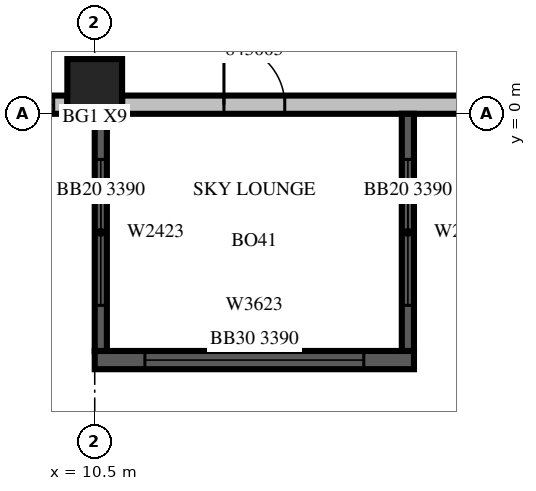
"""IFC4 building model, lengths in metres.
Left out: names, types, materials, properties, quantities, classifications, styles, units other than length and angle.
Written with IfcOpenShell. Run it as: python <this file> out.ifc"""

import sys

from ifc_helpers import new_model, si_unit, direction, frame, frame_2d, origin, origin_2d, place, context, subcontext, project, spatial, rectangle, extrude, source, transform, mapped, element, fill, save


model = new_model("IFC4")
c1 = context("Model", 3, precision=1e-05, world=origin(), true_north=direction((0.0, 1.0)))
c2 = subcontext(c1, "Body", "Model", "MODEL_VIEW")
j1 = project(units=[si_unit("LENGTHUNIT", "METRE"), si_unit("PLANEANGLEUNIT", "RADIAN")], contexts=[c1])
p1 = place(None, origin())
s1 = spatial("IfcSite", under=j1, at=p1, CompositionType="ELEMENT")
p2 = place(p1, origin())
s2 = spatial("IfcBuilding", under=s1, at=p2, CompositionType="ELEMENT")
p3 = place(p2, frame((0.0, 0.0, 196.8)))
s3 = spatial("IfcBuildingStorey", under=s2, at=p3, CompositionType="ELEMENT", Elevation=196.8)
m1 = source(origin(), c2, "Body", "SweptSolid", [
    extrude(rectangle(XDim=0.9, YDim=0.9, at=origin_2d()), origin(), (0.0, 0.0, 1.0), 3.8),
])
p4 = place(p3, frame((10.5, 0.45, 0.0), z_axis=(0.0, 0.0, 1.0), x_axis=(1.0, 0.0, 0.0)))
e1 = element("IfcColumn", 1, at=p4, inside=s3, PredefinedType="COLUMN", context=c2, shape_type="MappedRepresentation", body=[
    mapped(m1, transform((0.0, 0.0, 0.0), scale=1.0)),
])
m2 = source(origin(), c2, "Body", "SweptSolid", [
    extrude(rectangle(XDim=5.85, YDim=0.3, at=frame_2d((2.925, 0.0))), origin(), (0.0, 0.0, 1.0), 3.4),
])
p5 = place(p3, frame((4.2, 0.15, 0.0), z_axis=(0.0, 0.0, 1.0), x_axis=(1.0, 0.0, 0.0)))
e2 = element("IfcWall", 2, at=p5, inside=s3, PredefinedType="STANDARD", context=c2, shape_type="MappedRepresentation", body=[
    mapped(m2, transform((0.0, 0.0, 0.0), scale=1.0)),
])
m3 = source(origin(), c2, "Body", "SweptSolid", [
    extrude(rectangle(XDim=1.8, YDim=2.3, at=frame_2d((0.9, 1.15))), frame((0.0, 0.16, 0.0), z_axis=(0.0, -1.0, 0.0), x_axis=(1.0, 0.0, 0.0)), (0.0, 0.0, 1.0), 0.32),
])
p6 = place(p5, frame((0.675, 0.0, 0.6)))
e3 = element("IfcOpeningElement", 3, at=p6, cuts=e2, PredefinedType="OPENING", context=c2, shape_type="MappedRepresentation", body=[
    mapped(m3, transform((0.0, 0.0, 0.0), scale=1.0)),
])
p7 = place(p5, frame((3.825, 0.0, 0.6)))
e4 = element("IfcOpeningElement", 4, at=p7, cuts=e2, PredefinedType="OPENING", context=c2, shape_type="MappedRepresentation", body=[
    mapped(m3, transform((0.0, 0.0, 0.0), scale=1.0)),
])
m4 = source(origin(), c2, "Body", "SweptSolid", [
    extrude(rectangle(XDim=9.6, YDim=0.3, at=frame_2d((4.8, 0.0))), origin(), (0.0, 0.0, 1.0), 3.4),
])
p8 = place(p3, frame((10.95, 0.15, 0.0), z_axis=(0.0, 0.0, 1.0), x_axis=(1.0, 0.0, 0.0)))
e5 = element("IfcWall", 5, at=p8, inside=s3, PredefinedType="STANDARD", context=c2, shape_type="MappedRepresentation", body=[
    mapped(m4, transform((0.0, 0.0, 0.0), scale=1.0)),
])
m5 = source(origin(), c2, "Body", "SweptSolid", [
    extrude(rectangle(XDim=3.6, YDim=2.3, at=frame_2d((1.8, 1.15))), frame((0.0, 0.16, 0.0), z_axis=(0.0, -1.0, 0.0), x_axis=(1.0, 0.0, 0.0)), (0.0, 0.0, 1.0), 0.32),
])
p9 = place(p8, frame((5.625, 0.0, 0.6)))
e6 = element("IfcOpeningElement", 6, at=p9, cuts=e5, PredefinedType="OPENING", context=c2, shape_type="MappedRepresentation", body=[
    mapped(m5, transform((0.0, 0.0, 0.0), scale=1.0)),
])
m6 = source(origin(), c2, "Body", "SweptSolid", [
    extrude(rectangle(XDim=1.0, YDim=2.1, at=frame_2d((0.5, 1.05))), frame((0.0, 0.16, 0.0), z_axis=(0.0, -1.0, 0.0), x_axis=(1.0, 0.0, 0.0)), (0.0, 0.0, 1.0), 0.32),
])
p10 = place(p8, frame((1.675, 0.0, 0.0)))
e7 = element("IfcOpeningElement", 7, at=p10, cuts=e5, PredefinedType="OPENING", context=c2, shape_type="MappedRepresentation", body=[
    mapped(m6, transform((0.0, 0.0, 0.0), scale=1.0)),
])
m7 = source(origin(), c2, "Body", "SweptSolid", [
    extrude(rectangle(XDim=5.25, YDim=0.3, at=frame_2d((2.625, 0.0))), origin(), (0.0, 0.0, 1.0), 3.39),
])
p11 = place(p3, frame((10.5, -4.05, 0.0), z_axis=(0.0, 0.0, 1.0), x_axis=(1.0, 0.0, 0.0)))
e8 = element("IfcWall", 8, at=p11, inside=s3, PredefinedType="SOLIDWALL", context=c2, shape_type="MappedRepresentation", body=[
    mapped(m7, transform((0.0, 0.0, 0.0), scale=1.0)),
])
p12 = place(p11, frame((0.825, 0.0, 0.6)))
e9 = element("IfcOpeningElement", 9, at=p12, cuts=e8, PredefinedType="OPENING", context=c2, shape_type="MappedRepresentation", body=[
    mapped(m5, transform((0.0, 0.0, 0.0), scale=1.0)),
])
m8 = source(origin(), c2, "Body", "SweptSolid", [
    extrude(rectangle(XDim=3.9, YDim=0.2, at=frame_2d((1.95, 0.0))), origin(), (0.0, 0.0, 1.0), 3.39),
])
p13 = place(p3, frame((10.6, 0.0, 0.0), z_axis=(0.0, 0.0, 1.0), x_axis=(0.0, -1.0, 0.0)))
e10 = element("IfcWall", 10, at=p13, inside=s3, PredefinedType="SOLIDWALL", context=c2, shape_type="MappedRepresentation", body=[
    mapped(m8, transform((0.0, 0.0, 0.0), scale=1.0)),
])
m9 = source(origin(), c2, "Body", "SweptSolid", [
    extrude(rectangle(XDim=2.4, YDim=2.3, at=frame_2d((1.2, 1.15))), frame((0.0, 0.11, 0.0), z_axis=(0.0, -1.0, 0.0), x_axis=(1.0, 0.0, 0.0)), (0.0, 0.0, 1.0), 0.22),
])
p14 = place(p13, frame((0.75, 0.0, 0.6)))
e11 = element("IfcOpeningElement", 11, at=p14, cuts=e10, PredefinedType="OPENING", context=c2, shape_type="MappedRepresentation", body=[
    mapped(m9, transform((0.0, 0.0, 0.0), scale=1.0)),
])
p15 = place(p3, frame((15.65, 0.0, 0.0), z_axis=(0.0, 0.0, 1.0), x_axis=(0.0, -1.0, 0.0)))
e12 = element("IfcWall", 12, at=p15, inside=s3, PredefinedType="SOLIDWALL", context=c2, shape_type="MappedRepresentation", body=[
    mapped(m8, transform((0.0, 0.0, 0.0), scale=1.0)),
])
p16 = place(p15, frame((0.75, 0.0, 0.6)))
e13 = element("IfcOpeningElement", 13, at=p16, cuts=e12, PredefinedType="OPENING", context=c2, shape_type="MappedRepresentation", body=[
    mapped(m9, transform((0.0, 0.0, 0.0), scale=1.0)),
])
m10 = source(origin(), c2, "Body", "SweptSolid", [
    extrude(rectangle(XDim=1.8, YDim=2.3, at=frame_2d((0.9, 1.15))), frame((0.0, 0.03, 0.0), z_axis=(0.0, -1.0, 0.0), x_axis=(1.0, 0.0, 0.0)), (0.0, 0.0, 1.0), 0.06),
])
p17 = place(p7, origin())
e14 = element("IfcWindow", 14, at=p17, inside=s3, PartitioningType="SINGLE_PANEL", PredefinedType="WINDOW", context=c2, shape_type="MappedRepresentation", body=[
    mapped(m10, transform((0.0, 0.0, 0.0), scale=1.0)),
])
fill(e4, e14)
m11 = source(origin(), c2, "Body", "SweptSolid", [
    extrude(rectangle(XDim=3.6, YDim=2.3, at=frame_2d((1.8, 1.15))), frame((0.0, 0.03, 0.0), z_axis=(0.0, -1.0, 0.0), x_axis=(1.0, 0.0, 0.0)), (0.0, 0.0, 1.0), 0.06),
])
p18 = place(p12, origin())
e15 = element("IfcWindow", 15, at=p18, inside=s3, PartitioningType="SINGLE_PANEL", PredefinedType="WINDOW", context=c2, shape_type="MappedRepresentation", body=[
    mapped(m11, transform((0.0, 0.0, 0.0), scale=1.0)),
])
fill(e9, e15)
m12 = source(origin(), c2, "Body", "SweptSolid", [
    extrude(rectangle(XDim=2.4, YDim=2.3, at=frame_2d((1.2, 1.15))), frame((0.0, 0.03, 0.0), z_axis=(0.0, -1.0, 0.0), x_axis=(1.0, 0.0, 0.0)), (0.0, 0.0, 1.0), 0.06),
])
p19 = place(p14, origin())
e16 = element("IfcWindow", 16, at=p19, inside=s3, PartitioningType="SINGLE_PANEL", PredefinedType="WINDOW", context=c2, shape_type="MappedRepresentation", body=[
    mapped(m12, transform((0.0, 0.0, 0.0), scale=1.0)),
])
fill(e11, e16)
p20 = place(p16, origin())
e17 = element("IfcWindow", 17, at=p20, inside=s3, PartitioningType="SINGLE_PANEL", PredefinedType="WINDOW", context=c2, shape_type="MappedRepresentation", body=[
    mapped(m12, transform((0.0, 0.0, 0.0), scale=1.0)),
])
fill(e13, e17)
m13 = source(origin(), c2, "Body", "SweptSolid", [
    extrude(rectangle(XDim=1.0, YDim=2.1, at=frame_2d((0.5, 1.05))), frame((0.0, 0.025, 0.0), z_axis=(0.0, -1.0, 0.0), x_axis=(1.0, 0.0, 0.0)), (0.0, 0.0, 1.0), 0.05),
])
p21 = place(p10, origin())
e18 = element("IfcDoor", 18, at=p21, inside=s3, OperationType="SINGLE_SWING_LEFT", PredefinedType="DOOR", context=c2, shape_type="MappedRepresentation", body=[
    mapped(m13, transform((0.0, 0.0, 0.0), scale=1.0)),
])
fill(e7, e18)
save(model, sys.argv[1])
